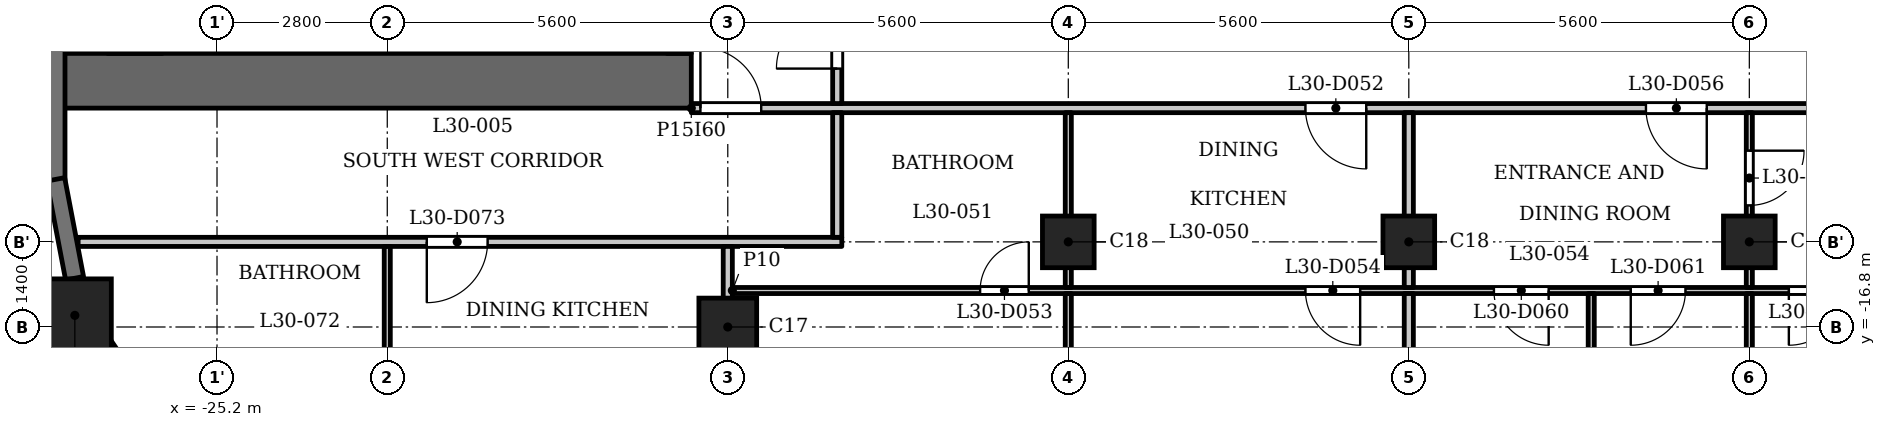
"""IFC4 building model, lengths in metres.
Left out: names, types, materials, properties, quantities, classifications, styles, units other than length and angle.
Written with IfcOpenShell. Run it as: python <this file> out.ifc"""

import sys

from ifc_helpers import new_model, si_unit, direction, frame, frame_2d, origin, origin_2d, place, context, subcontext, project, spatial, rectangle, extrude, element, fill, save


model = new_model("IFC4")
c1 = context("Model", 3, precision=1e-05, world=origin(), true_north=direction((0.0, 1.0)))
c2 = subcontext(c1, "Body", "Model", "MODEL_VIEW")
j1 = project(units=[si_unit("LENGTHUNIT", "METRE"), si_unit("PLANEANGLEUNIT", "RADIAN")], contexts=[c1])
p1 = place(None, origin())
s1 = spatial("IfcSite", under=j1, at=p1, CompositionType="ELEMENT")
p2 = place(p1, origin())
s2 = spatial("IfcBuilding", under=s1, at=p2, CompositionType="ELEMENT")
p3 = place(p2, frame((0.0, 0.0, 118.3)))
s3 = spatial("IfcBuildingStorey", under=s2, at=p3, CompositionType="ELEMENT", Elevation=118.3)
p4 = place(p3, frame((-27.538, -16.609, 0.0), z_axis=(0.0, 0.0, 1.0), x_axis=(1.0, 0.0, 0.0)))
e1 = element("IfcColumn", 1, at=p4, inside=s3, PredefinedType="COLUMN", context=c2, shape_type="SweptSolid", body=[
    extrude(rectangle(XDim=1.2, YDim=1.2, at=origin_2d()), origin(), (0.0, 0.0, 1.0), 3.5),
])
p5 = place(p3, frame((-16.8, -16.8, 0.0), z_axis=(0.0, 0.0, 1.0), x_axis=(1.0, 0.0, 0.0)))
e2 = element("IfcColumn", 2, at=p5, inside=s3, PredefinedType="COLUMN", context=c2, shape_type="SweptSolid", body=[
    extrude(rectangle(XDim=0.95, YDim=0.95, at=origin_2d()), origin(), (0.0, 0.0, 1.0), 3.5),
])
for number, where, z_axis, x_axis in (
    (3, (-11.2, -15.4, 0.0), (0.0, 0.0, 1.0), (1.0, 0.0, 0.0)),
    (4, (-5.6, -15.4, 0.0), (0.0, 0.0, 1.0), (1.0, 0.0, 0.0)),
    (5, (0.0, -15.4, 0.0), (0.0, 0.0, 1.0), (1.0, 0.0, 0.0)),
):
    element("IfcColumn", number, at=place(p3, frame(where, z_axis=z_axis, x_axis=x_axis)), inside=s3, PredefinedType="COLUMN", context=c2, shape_type="SweptSolid", body=[
        extrude(rectangle(XDim=0.85, YDim=0.85, at=origin_2d()), origin(), (0.0, 0.0, 1.0), 3.5),
    ])
p6 = place(p3, frame((-27.85, -11.8, 0.0), z_axis=(0.0, 0.0, 1.0), x_axis=(0.0, -1.0, 0.0)))
e6 = element("IfcWall", 6, at=p6, inside=s3, PredefinedType="SOLIDWALL", context=c2, shape_type="SweptSolid", body=[
    extrude(rectangle(XDim=2.6, YDim=0.3, at=frame_2d((1.3, 0.0))), origin(), (0.0, 0.0, 1.0), 2.4),
])
for number, where, z_axis, x_axis in (
    (7, (-27.853, -14.372, 0.0), (0.0, 0.0, 1.0), (0.187, -0.982, 0.0)),
    (8, (-27.11, -17.043, 0.0), (0.0, 0.0, 1.0), (0.562, -0.827, 0.0)),
):
    element("IfcWall", number, at=place(p3, frame(where, z_axis=z_axis, x_axis=x_axis)), inside=s3, PredefinedType="SOLIDWALL", context=c2, shape_type="SweptSolid", body=[
        extrude(rectangle(XDim=1.656, YDim=0.3, at=frame_2d((0.828, 0.0))), origin(), (0.0, 0.0, 1.0), 2.4),
    ])
p7 = place(p3, frame((-17.4, -12.75, 0.0), z_axis=(0.0, 0.0, 1.0), x_axis=(-1.0, 0.0, 0.0)))
e9 = element("IfcWall", 9, at=p7, inside=s3, PredefinedType="SHEAR", context=c2, shape_type="SweptSolid", body=[
    extrude(rectangle(XDim=10.4, YDim=0.9, at=frame_2d((5.2, 0.0))), origin(), (0.0, 0.0, 1.0), 3.2),
])
p8 = place(p3, frame((-17.6, -12.3, 0.0), z_axis=(0.0, 0.0, 1.0), x_axis=(0.0, 1.0, 0.0)))
e10 = element("IfcWall", 10, at=p8, inside=s3, PredefinedType="SHEAR", context=c2, shape_type="SweptSolid", body=[
    extrude(rectangle(XDim=24.6, YDim=0.4, at=frame_2d((12.3, 0.0))), origin(), (0.0, 0.0, 1.0), 3.2),
])
p9 = place(p8, frame((6.0, 0.0, 0.0)))
e11 = element("IfcOpeningElement", 11, at=p9, cuts=e10, PredefinedType="OPENING", context=c2, shape_type="SweptSolid", body=[
    extrude(rectangle(XDim=1.1, YDim=2.1, at=frame_2d((0.55, 1.05))), frame((0.0, 0.21, 0.0), z_axis=(0.0, -1.0, 0.0), x_axis=(1.0, 0.0, 0.0)), (0.0, 0.0, 1.0), 0.42),
])
p10 = place(p8, frame((8.4, 0.0, 0.0)))
e12 = element("IfcOpeningElement", 12, at=p10, cuts=e10, PredefinedType="OPENING", context=c2, shape_type="SweptSolid", body=[
    extrude(rectangle(XDim=1.1, YDim=2.1, at=frame_2d((0.55, 1.05))), frame((0.0, 0.21, 0.0), z_axis=(0.0, -1.0, 0.0), x_axis=(1.0, 0.0, 0.0)), (0.0, 0.0, 1.0), 0.42),
])
p11 = place(p8, frame((10.8, 0.0, 0.0)))
e13 = element("IfcOpeningElement", 13, at=p11, cuts=e10, PredefinedType="OPENING", context=c2, shape_type="SweptSolid", body=[
    extrude(rectangle(XDim=1.1, YDim=2.1, at=frame_2d((0.55, 1.05))), frame((0.0, 0.21, 0.0), z_axis=(0.0, -1.0, 0.0), x_axis=(1.0, 0.0, 0.0)), (0.0, 0.0, 1.0), 0.42),
])
p12 = place(p8, frame((16.75, 0.0, 0.0)))
e14 = element("IfcOpeningElement", 14, at=p12, cuts=e10, PredefinedType="OPENING", context=c2, shape_type="SweptSolid", body=[
    extrude(rectangle(XDim=0.9, YDim=2.1, at=frame_2d((0.45, 1.05))), frame((0.0, 0.21, 0.0), z_axis=(0.0, -1.0, 0.0), x_axis=(1.0, 0.0, 0.0)), (0.0, 0.0, 1.0), 0.42),
])
p13 = place(p8, frame((22.8, 0.0, 0.0)))
e15 = element("IfcOpeningElement", 15, at=p13, cuts=e10, PredefinedType="OPENING", context=c2, shape_type="SweptSolid", body=[
    extrude(rectangle(XDim=1.1, YDim=2.1, at=frame_2d((0.55, 1.05))), frame((0.0, 0.21, 0.0), z_axis=(0.0, -1.0, 0.0), x_axis=(1.0, 0.0, 0.0)), (0.0, 0.0, 1.0), 0.42),
])
p14 = place(p8, frame((0.7, 0.0, 0.0)))
e16 = element("IfcOpeningElement", 16, at=p14, cuts=e10, PredefinedType="OPENING", context=c2, shape_type="SweptSolid", body=[
    extrude(rectangle(XDim=1.1, YDim=2.1, at=frame_2d((0.55, 1.05))), frame((0.0, 0.21, 0.0), z_axis=(0.0, -1.0, 0.0), x_axis=(1.0, 0.0, 0.0)), (0.0, 0.0, 1.0), 0.42),
])
p15 = place(p8, frame((12.775, 0.0, 0.0)))
e17 = element("IfcOpeningElement", 17, at=p15, cuts=e10, PredefinedType="OPENING", context=c2, shape_type="SweptSolid", body=[
    extrude(rectangle(XDim=1.8, YDim=2.1, at=frame_2d((0.9, 1.05))), frame((0.0, 0.21, 0.0), z_axis=(0.0, -1.0, 0.0), x_axis=(1.0, 0.0, 0.0)), (0.0, 0.0, 1.0), 0.42),
])
p16 = place(p3, frame((-26.55, -12.3, 0.0), z_axis=(0.0, 0.0, 1.0), x_axis=(0.0, 1.0, 0.0)))
e18 = element("IfcWall", 18, at=p16, inside=s3, PredefinedType="SHEAR", context=c2, shape_type="SweptSolid", body=[
    extrude(rectangle(XDim=24.6, YDim=0.9, at=frame_2d((12.3, 0.0))), origin(), (0.0, 0.0, 1.0), 3.2),
])
p17 = place(p3, frame((-23.55, -12.3, 0.0), z_axis=(0.0, 0.0, 1.0), x_axis=(0.0, 1.0, 0.0)))
e19 = element("IfcWall", 19, at=p17, inside=s3, PredefinedType="PARTITIONING", context=c2, shape_type="SweptSolid", body=[
    extrude(rectangle(XDim=2.5, YDim=0.2, at=frame_2d((1.25, 0.0))), origin(), (0.0, 0.0, 1.0), 3.2),
])
p18 = place(p17, frame((0.8, 0.0, 0.0)))
e20 = element("IfcOpeningElement", 20, at=p18, cuts=e19, PredefinedType="OPENING", context=c2, shape_type="SweptSolid", body=[
    extrude(rectangle(XDim=0.9, YDim=2.1, at=frame_2d((0.45, 1.05))), frame((0.0, 0.11, 0.0), z_axis=(0.0, -1.0, 0.0), x_axis=(1.0, 0.0, 0.0)), (0.0, 0.0, 1.0), 0.22),
])
p19 = place(p3, frame((-16.725, -16.2, 0.0), z_axis=(0.0, 0.0, 1.0), x_axis=(1.0, 0.0, 0.0)))
e21 = element("IfcWall", 21, at=p19, inside=s3, PredefinedType="PARTITIONING", context=c2, shape_type="SweptSolid", body=[
    extrude(rectangle(XDim=33.45, YDim=0.1, at=frame_2d((16.725, 0.0))), origin(), (0.0, 0.0, 1.0), 3.2),
])
p20 = place(p19, frame((4.075, 0.0, 0.0)))
e22 = element("IfcOpeningElement", 22, at=p20, cuts=e21, PredefinedType="OPENING", context=c2, shape_type="SweptSolid", body=[
    extrude(rectangle(XDim=0.8, YDim=2.1, at=frame_2d((0.4, 1.05))), frame((0.0, 0.06, 0.0), z_axis=(0.0, -1.0, 0.0), x_axis=(1.0, 0.0, 0.0)), (0.0, 0.0, 1.0), 0.12),
])
p21 = place(p19, frame((9.425, 0.0, 0.0)))
e23 = element("IfcOpeningElement", 23, at=p21, cuts=e21, PredefinedType="OPENING", context=c2, shape_type="SweptSolid", body=[
    extrude(rectangle(XDim=0.9, YDim=2.1, at=frame_2d((0.45, 1.05))), frame((0.0, 0.06, 0.0), z_axis=(0.0, -1.0, 0.0), x_axis=(1.0, 0.0, 0.0)), (0.0, 0.0, 1.0), 0.12),
])
p22 = place(p19, frame((19.875, 0.0, 0.0)))
e24 = element("IfcOpeningElement", 24, at=p22, cuts=e21, PredefinedType="OPENING", context=c2, shape_type="SweptSolid", body=[
    extrude(rectangle(XDim=0.8, YDim=2.1, at=frame_2d((0.4, 1.05))), frame((0.0, 0.06, 0.0), z_axis=(0.0, -1.0, 0.0), x_axis=(1.0, 0.0, 0.0)), (0.0, 0.0, 1.0), 0.12),
])
p23 = place(p19, frame((17.375, 0.0, 0.0)))
e25 = element("IfcOpeningElement", 25, at=p23, cuts=e21, PredefinedType="OPENING", context=c2, shape_type="SweptSolid", body=[
    extrude(rectangle(XDim=0.9, YDim=2.1, at=frame_2d((0.45, 1.05))), frame((0.0, 0.06, 0.0), z_axis=(0.0, -1.0, 0.0), x_axis=(1.0, 0.0, 0.0)), (0.0, 0.0, 1.0), 0.12),
])
p24 = place(p19, frame((12.525, 0.0, 0.0)))
e26 = element("IfcOpeningElement", 26, at=p24, cuts=e21, PredefinedType="OPENING", context=c2, shape_type="SweptSolid", body=[
    extrude(rectangle(XDim=0.9, YDim=2.1, at=frame_2d((0.45, 1.05))), frame((0.0, 0.06, 0.0), z_axis=(0.0, -1.0, 0.0), x_axis=(1.0, 0.0, 0.0)), (0.0, 0.0, 1.0), 0.12),
])
p25 = place(p19, frame((14.775, 0.0, 0.0)))
e27 = element("IfcOpeningElement", 27, at=p25, cuts=e21, PredefinedType="OPENING", context=c2, shape_type="SweptSolid", body=[
    extrude(rectangle(XDim=0.9, YDim=2.1, at=frame_2d((0.45, 1.05))), frame((0.0, 0.06, 0.0), z_axis=(0.0, -1.0, 0.0), x_axis=(1.0, 0.0, 0.0)), (0.0, 0.0, 1.0), 0.12),
])
p26 = place(p19, frame((26.475, 0.0, 0.0)))
e28 = element("IfcOpeningElement", 28, at=p26, cuts=e21, PredefinedType="OPENING", context=c2, shape_type="SweptSolid", body=[
    extrude(rectangle(XDim=0.8, YDim=2.1, at=frame_2d((0.4, 1.05))), frame((0.0, 0.06, 0.0), z_axis=(0.0, -1.0, 0.0), x_axis=(1.0, 0.0, 0.0)), (0.0, 0.0, 1.0), 0.12),
])
p27 = place(p19, frame((23.725, 0.0, 0.0)))
e29 = element("IfcOpeningElement", 29, at=p27, cuts=e21, PredefinedType="OPENING", context=c2, shape_type="SweptSolid", body=[
    extrude(rectangle(XDim=0.9, YDim=2.1, at=frame_2d((0.45, 1.05))), frame((0.0, 0.06, 0.0), z_axis=(0.0, -1.0, 0.0), x_axis=(1.0, 0.0, 0.0)), (0.0, 0.0, 1.0), 0.12),
])
p28 = place(p19, frame((29.075, 0.0, 0.0)))
e30 = element("IfcOpeningElement", 30, at=p28, cuts=e21, PredefinedType="OPENING", context=c2, shape_type="SweptSolid", body=[
    extrude(rectangle(XDim=0.8, YDim=2.1, at=frame_2d((0.4, 1.05))), frame((0.0, 0.06, 0.0), z_axis=(0.0, -1.0, 0.0), x_axis=(1.0, 0.0, 0.0)), (0.0, 0.0, 1.0), 0.12),
])
p29 = place(p19, frame((30.675, 0.0, 0.0)))
e31 = element("IfcOpeningElement", 31, at=p29, cuts=e21, PredefinedType="OPENING", context=c2, shape_type="SweptSolid", body=[
    extrude(rectangle(XDim=0.9, YDim=2.1, at=frame_2d((0.45, 1.05))), frame((0.0, 0.06, 0.0), z_axis=(0.0, -1.0, 0.0), x_axis=(1.0, 0.0, 0.0)), (0.0, 0.0, 1.0), 0.12),
])
p30 = place(p3, frame((-27.484, -15.4, 0.0), z_axis=(0.0, 0.0, 1.0), x_axis=(1.0, 0.0, 0.0)))
e32 = element("IfcWall", 32, at=p30, inside=s3, PredefinedType="PARTITIONING", context=c2, shape_type="SweptSolid", body=[
    extrude(rectangle(XDim=12.559, YDim=0.15, at=frame_2d((6.279, 0.0))), origin(), (0.0, 0.0, 1.0), 3.2),
])
p31 = place(p30, frame((5.734, 0.0, 0.0)))
e33 = element("IfcOpeningElement", 33, at=p31, cuts=e32, PredefinedType="OPENING", context=c2, shape_type="SweptSolid", body=[
    extrude(rectangle(XDim=1.0, YDim=2.1, at=frame_2d((0.5, 1.05))), frame((0.0, 0.085, 0.0), z_axis=(0.0, -1.0, 0.0), x_axis=(1.0, 0.0, 0.0)), (0.0, 0.0, 1.0), 0.17),
])
p32 = place(p3, frame((-17.4, -13.2, 0.0), z_axis=(0.0, 0.0, 1.0), x_axis=(1.0, 0.0, 0.0)))
e34 = element("IfcWall", 34, at=p32, inside=s3, PredefinedType="PARTITIONING", context=c2, shape_type="SweptSolid", body=[
    extrude(rectangle(XDim=34.8, YDim=0.15, at=frame_2d((17.4, 0.0))), origin(), (0.0, 0.0, 1.0), 3.2),
])
p33 = place(p32, frame((0.15, 0.0, 0.0)))
e35 = element("IfcOpeningElement", 35, at=p33, cuts=e34, PredefinedType="OPENING", context=c2, shape_type="SweptSolid", body=[
    extrude(rectangle(XDim=1.0, YDim=2.1, at=frame_2d((0.5, 1.05))), frame((0.0, 0.085, 0.0), z_axis=(0.0, -1.0, 0.0), x_axis=(1.0, 0.0, 0.0)), (0.0, 0.0, 1.0), 0.17),
])
p34 = place(p32, frame((33.55, 0.0, 0.0)))
e36 = element("IfcOpeningElement", 36, at=p34, cuts=e34, PredefinedType="OPENING", context=c2, shape_type="SweptSolid", body=[
    extrude(rectangle(XDim=1.0, YDim=2.1, at=frame_2d((0.5, 1.05))), frame((0.0, 0.085, 0.0), z_axis=(0.0, -1.0, 0.0), x_axis=(1.0, 0.0, 0.0)), (0.0, 0.0, 1.0), 0.17),
])
p35 = place(p32, frame((10.1, 0.0, 0.0)))
e37 = element("IfcOpeningElement", 37, at=p35, cuts=e34, PredefinedType="OPENING", context=c2, shape_type="SweptSolid", body=[
    extrude(rectangle(XDim=1.0, YDim=2.1, at=frame_2d((0.5, 1.05))), frame((0.0, 0.085, 0.0), z_axis=(0.0, -1.0, 0.0), x_axis=(1.0, 0.0, 0.0)), (0.0, 0.0, 1.0), 0.17),
])
p36 = place(p32, frame((15.7, 0.0, 0.0)))
e38 = element("IfcOpeningElement", 38, at=p36, cuts=e34, PredefinedType="OPENING", context=c2, shape_type="SweptSolid", body=[
    extrude(rectangle(XDim=1.0, YDim=2.1, at=frame_2d((0.5, 1.05))), frame((0.0, 0.085, 0.0), z_axis=(0.0, -1.0, 0.0), x_axis=(1.0, 0.0, 0.0)), (0.0, 0.0, 1.0), 0.17),
])
p37 = place(p32, frame((24.9, 0.0, 0.0)))
e39 = element("IfcOpeningElement", 39, at=p37, cuts=e34, PredefinedType="OPENING", context=c2, shape_type="SweptSolid", body=[
    extrude(rectangle(XDim=1.0, YDim=2.1, at=frame_2d((0.5, 1.05))), frame((0.0, 0.085, 0.0), z_axis=(0.0, -1.0, 0.0), x_axis=(1.0, 0.0, 0.0)), (0.0, 0.0, 1.0), 0.17),
])
p38 = place(p3, frame((-22.4, -18.05, 0.0), z_axis=(0.0, 0.0, 1.0), x_axis=(0.0, 1.0, 0.0)))
e40 = element("IfcWall", 40, at=p38, inside=s3, PredefinedType="PARTITIONING", context=c2, shape_type="SweptSolid", body=[
    extrude(rectangle(XDim=2.575, YDim=0.1, at=frame_2d((1.288, 0.0))), origin(), (0.0, 0.0, 1.0), 3.2),
])
p39 = place(p3, frame((-16.8, -22.98, 0.0), z_axis=(0.0, 0.0, 1.0), x_axis=(0.0, 1.0, 0.0)))
e41 = element("IfcWall", 41, at=p39, inside=s3, PredefinedType="PARTITIONING", context=c2, shape_type="SweptSolid", body=[
    extrude(rectangle(XDim=7.505, YDim=0.15, at=frame_2d((3.752, 0.0))), origin(), (0.0, 0.0, 1.0), 3.2),
])
p40 = place(p3, frame((-15.0, -15.325, 0.0), z_axis=(0.0, 0.0, 1.0), x_axis=(0.0, 1.0, 0.0)))
e42 = element("IfcWall", 42, at=p40, inside=s3, PredefinedType="PARTITIONING", context=c2, shape_type="SweptSolid", body=[
    extrude(rectangle(XDim=2.05, YDim=0.15, at=frame_2d((1.025, 0.0))), origin(), (0.0, 0.0, 1.0), 3.2),
])
p41 = place(p3, frame((-15.0, -13.125, 0.0), z_axis=(0.0, 0.0, 1.0), x_axis=(0.0, 1.0, 0.0)))
e43 = element("IfcWall", 43, at=p41, inside=s3, PredefinedType="PARTITIONING", context=c2, shape_type="SweptSolid", body=[
    extrude(rectangle(XDim=6.356, YDim=0.15, at=frame_2d((3.178, 0.0))), origin(), (0.0, 0.0, 1.0), 3.2),
])
p42 = place(p41, frame((0.575, 0.0, 0.0)))
e44 = element("IfcOpeningElement", 44, at=p42, cuts=e43, PredefinedType="OPENING", context=c2, shape_type="SweptSolid", body=[
    extrude(rectangle(XDim=1.0, YDim=2.1, at=frame_2d((0.5, 1.05))), frame((0.0, 0.085, 0.0), z_axis=(0.0, -1.0, 0.0), x_axis=(1.0, 0.0, 0.0)), (0.0, 0.0, 1.0), 0.17),
])
p43 = place(p3, frame((-11.2, -22.98, 0.0), z_axis=(0.0, 0.0, 1.0), x_axis=(0.0, 1.0, 0.0)))
e45 = element("IfcWall", 45, at=p43, inside=s3, PredefinedType="PARTITIONING", context=c2, shape_type="SweptSolid", body=[
    extrude(rectangle(XDim=6.73, YDim=0.1, at=frame_2d((3.365, 0.0))), origin(), (0.0, 0.0, 1.0), 3.2),
])
p44 = place(p43, frame((4.48, 0.0, 0.0)))
e46 = element("IfcOpeningElement", 46, at=p44, cuts=e45, PredefinedType="OPENING", context=c2, shape_type="SweptSolid", body=[
    extrude(rectangle(XDim=0.9, YDim=2.1, at=frame_2d((0.45, 1.05))), frame((0.0, 0.06, 0.0), z_axis=(0.0, -1.0, 0.0), x_axis=(1.0, 0.0, 0.0)), (0.0, 0.0, 1.0), 0.12),
])
p45 = place(p3, frame((-11.2, -16.15, 0.0), z_axis=(0.0, 0.0, 1.0), x_axis=(0.0, 1.0, 0.0)))
e47 = element("IfcWall", 47, at=p45, inside=s3, PredefinedType="PARTITIONING", context=c2, shape_type="SweptSolid", body=[
    extrude(rectangle(XDim=2.875, YDim=0.1, at=frame_2d((1.438, 0.0))), origin(), (0.0, 0.0, 1.0), 3.2),
])
p46 = place(p3, frame((-5.6, -22.98, 0.0), z_axis=(0.0, 0.0, 1.0), x_axis=(0.0, 1.0, 0.0)))
e48 = element("IfcWall", 48, at=p46, inside=s3, PredefinedType="PARTITIONING", context=c2, shape_type="SweptSolid", body=[
    extrude(rectangle(XDim=6.73, YDim=0.15, at=frame_2d((3.365, 0.0))), origin(), (0.0, 0.0, 1.0), 3.2),
])
p47 = place(p3, frame((-5.6, -16.15, 0.0), z_axis=(0.0, 0.0, 1.0), x_axis=(0.0, 1.0, 0.0)))
e49 = element("IfcWall", 49, at=p47, inside=s3, PredefinedType="PARTITIONING", context=c2, shape_type="SweptSolid", body=[
    extrude(rectangle(XDim=2.875, YDim=0.15, at=frame_2d((1.438, 0.0))), origin(), (0.0, 0.0, 1.0), 3.2),
])
p48 = place(p3, frame((-2.6, -22.08, 0.0), z_axis=(0.0, 0.0, 1.0), x_axis=(0.0, 1.0, 0.0)))
e50 = element("IfcWall", 50, at=p48, inside=s3, PredefinedType="PARTITIONING", context=c2, shape_type="SweptSolid", body=[
    extrude(rectangle(XDim=5.83, YDim=0.1, at=frame_2d((2.915, 0.0))), origin(), (0.0, 0.0, 1.0), 3.2),
])
p49 = place(p3, frame((0.0, -22.98, 0.0), z_axis=(0.0, 0.0, 1.0), x_axis=(0.0, 1.0, 0.0)))
e51 = element("IfcWall", 51, at=p49, inside=s3, PredefinedType="PARTITIONING", context=c2, shape_type="SweptSolid", body=[
    extrude(rectangle(XDim=6.73, YDim=0.1, at=frame_2d((3.365, 0.0))), origin(), (0.0, 0.0, 1.0), 3.2),
])
p50 = place(p3, frame((0.0, -16.15, 0.0), z_axis=(0.0, 0.0, 1.0), x_axis=(0.0, 1.0, 0.0)))
e52 = element("IfcWall", 52, at=p50, inside=s3, PredefinedType="PARTITIONING", context=c2, shape_type="SweptSolid", body=[
    extrude(rectangle(XDim=2.875, YDim=0.1, at=frame_2d((1.438, 0.0))), origin(), (0.0, 0.0, 1.0), 3.2),
])
p51 = place(p50, frame((1.35, 0.0, 0.0)))
e53 = element("IfcOpeningElement", 53, at=p51, cuts=e52, PredefinedType="OPENING", context=c2, shape_type="SweptSolid", body=[
    extrude(rectangle(XDim=0.9, YDim=2.1, at=frame_2d((0.45, 1.05))), frame((0.0, 0.06, 0.0), z_axis=(0.0, -1.0, 0.0), x_axis=(1.0, 0.0, 0.0)), (0.0, 0.0, 1.0), 0.12),
])
p52 = place(p42, origin())
e54 = element("IfcDoor", 54, at=p52, inside=s3, OperationType="SINGLE_SWING_RIGHT", PredefinedType="DOOR", context=c2, shape_type="SweptSolid", body=[
    extrude(rectangle(XDim=1.0, YDim=2.1, at=frame_2d((0.5, 1.05))), frame((0.0, 0.025, 0.0), z_axis=(0.0, -1.0, 0.0), x_axis=(1.0, 0.0, 0.0)), (0.0, 0.0, 1.0), 0.05),
])
fill(e44, e54)
p53 = place(p33, origin())
e55 = element("IfcDoor", 55, at=p53, inside=s3, OperationType="SINGLE_SWING_RIGHT", PredefinedType="DOOR", context=c2, shape_type="SweptSolid", body=[
    extrude(rectangle(XDim=1.0, YDim=2.1, at=frame_2d((0.5, 1.05))), frame((0.0, 0.025, 0.0), z_axis=(0.0, -1.0, 0.0), x_axis=(1.0, 0.0, 0.0)), (0.0, 0.0, 1.0), 0.05),
])
fill(e35, e55)
p54 = place(p35, origin())
e56 = element("IfcDoor", 56, at=p54, inside=s3, OperationType="SINGLE_SWING_RIGHT", PredefinedType="DOOR", context=c2, shape_type="SweptSolid", body=[
    extrude(rectangle(XDim=1.0, YDim=2.1, at=frame_2d((0.5, 1.05))), frame((0.0, 0.025, 0.0), z_axis=(0.0, -1.0, 0.0), x_axis=(1.0, 0.0, 0.0)), (0.0, 0.0, 1.0), 0.05),
])
fill(e37, e56)
p55 = place(p20, origin())
e57 = element("IfcDoor", 57, at=p55, inside=s3, OperationType="SINGLE_SWING_LEFT", PredefinedType="DOOR", context=c2, shape_type="SweptSolid", body=[
    extrude(rectangle(XDim=0.8, YDim=2.1, at=frame_2d((0.4, 1.05))), frame((0.0, 0.025, 0.0), z_axis=(0.0, -1.0, 0.0), x_axis=(1.0, 0.0, 0.0)), (0.0, 0.0, 1.0), 0.05),
])
fill(e22, e57)
p56 = place(p21, origin())
e58 = element("IfcDoor", 58, at=p56, inside=s3, OperationType="SINGLE_SWING_RIGHT", PredefinedType="DOOR", context=c2, shape_type="SweptSolid", body=[
    extrude(rectangle(XDim=0.9, YDim=2.1, at=frame_2d((0.45, 1.05))), frame((0.0, 0.025, 0.0), z_axis=(0.0, -1.0, 0.0), x_axis=(1.0, 0.0, 0.0)), (0.0, 0.0, 1.0), 0.05),
])
fill(e23, e58)
p57 = place(p36, origin())
e59 = element("IfcDoor", 59, at=p57, inside=s3, OperationType="SINGLE_SWING_RIGHT", PredefinedType="DOOR", context=c2, shape_type="SweptSolid", body=[
    extrude(rectangle(XDim=1.0, YDim=2.1, at=frame_2d((0.5, 1.05))), frame((0.0, 0.025, 0.0), z_axis=(0.0, -1.0, 0.0), x_axis=(1.0, 0.0, 0.0)), (0.0, 0.0, 1.0), 0.05),
])
fill(e38, e59)
p58 = place(p51, origin())
e60 = element("IfcDoor", 60, at=p58, inside=s3, OperationType="SINGLE_SWING_RIGHT", PredefinedType="DOOR", context=c2, shape_type="SweptSolid", body=[
    extrude(rectangle(XDim=0.9, YDim=2.1, at=frame_2d((0.45, 1.05))), frame((0.0, 0.025, 0.0), z_axis=(0.0, -1.0, 0.0), x_axis=(1.0, 0.0, 0.0)), (0.0, 0.0, 1.0), 0.05),
])
fill(e53, e60)
p59 = place(p23, origin())
e61 = element("IfcDoor", 61, at=p59, inside=s3, OperationType="SINGLE_SWING_LEFT", PredefinedType="DOOR", context=c2, shape_type="SweptSolid", body=[
    extrude(rectangle(XDim=0.9, YDim=2.1, at=frame_2d((0.45, 1.05))), frame((0.0, 0.025, 0.0), z_axis=(0.0, -1.0, 0.0), x_axis=(1.0, 0.0, 0.0)), (0.0, 0.0, 1.0), 0.05),
])
fill(e25, e61)
p60 = place(p24, origin())
e62 = element("IfcDoor", 62, at=p60, inside=s3, OperationType="SINGLE_SWING_RIGHT", PredefinedType="DOOR", context=c2, shape_type="SweptSolid", body=[
    extrude(rectangle(XDim=0.9, YDim=2.1, at=frame_2d((0.45, 1.05))), frame((0.0, 0.025, 0.0), z_axis=(0.0, -1.0, 0.0), x_axis=(1.0, 0.0, 0.0)), (0.0, 0.0, 1.0), 0.05),
])
fill(e26, e62)
p61 = place(p25, origin())
e63 = element("IfcDoor", 63, at=p61, inside=s3, OperationType="SINGLE_SWING_LEFT", PredefinedType="DOOR", context=c2, shape_type="SweptSolid", body=[
    extrude(rectangle(XDim=0.9, YDim=2.1, at=frame_2d((0.45, 1.05))), frame((0.0, 0.025, 0.0), z_axis=(0.0, -1.0, 0.0), x_axis=(1.0, 0.0, 0.0)), (0.0, 0.0, 1.0), 0.05),
])
fill(e27, e63)
p62 = place(p31, origin())
e64 = element("IfcDoor", 64, at=p62, inside=s3, OperationType="SINGLE_SWING_LEFT", PredefinedType="DOOR", context=c2, shape_type="SweptSolid", body=[
    extrude(rectangle(XDim=1.0, YDim=2.1, at=frame_2d((0.5, 1.05))), frame((0.0, 0.025, 0.0), z_axis=(0.0, -1.0, 0.0), x_axis=(1.0, 0.0, 0.0)), (0.0, 0.0, 1.0), 0.05),
])
fill(e33, e64)
save(model, sys.argv[1])
